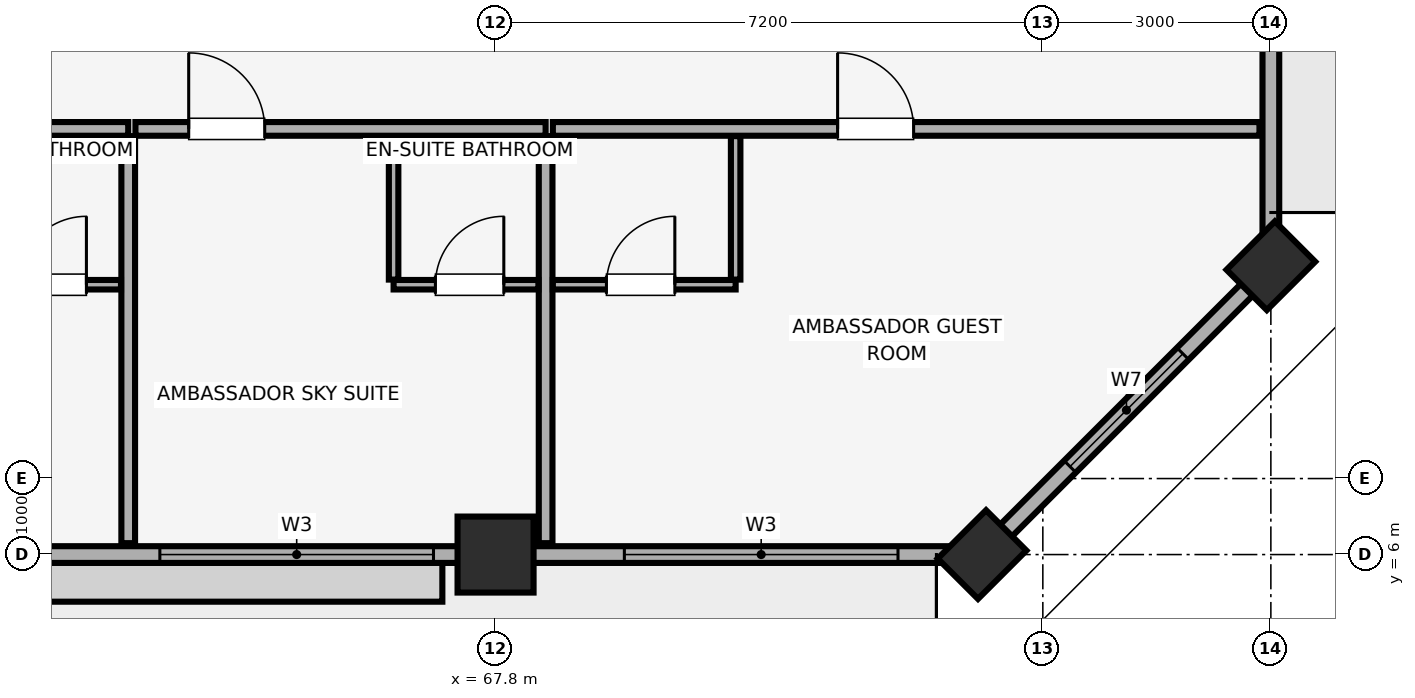
"""IFC4 building model, lengths in metres.
Left out: names, types, materials, properties, quantities, classifications, styles, units other than length and angle.
Written with IfcOpenShell. Run it as: python <this file> out.ifc"""

import sys

from ifc_helpers import new_model, si_unit, direction, frame, frame_2d, origin, origin_2d, place, context, subcontext, project, spatial, rectangle, extrude, element, fill, save


model = new_model("IFC4")
c1 = context("Model", 3, precision=1e-05, world=origin(), true_north=direction((0.0, 1.0)))
c2 = subcontext(c1, "Body", "Model", "MODEL_VIEW")
j1 = project(units=[si_unit("LENGTHUNIT", "METRE"), si_unit("PLANEANGLEUNIT", "RADIAN")], contexts=[c1])
p1 = place(None, origin())
s1 = spatial("IfcSite", under=j1, at=p1, CompositionType="ELEMENT")
p2 = place(p1, origin())
s2 = spatial("IfcBuilding", under=s1, at=p2, CompositionType="ELEMENT")
p3 = place(p2, frame((0.0, 0.0, 229.15)))
s3 = spatial("IfcBuildingStorey", under=s2, at=p3, CompositionType="ELEMENT", Elevation=229.15)
p4 = place(p3, frame((67.8, 6.0, 0.0), z_axis=(0.0, 0.0, 1.0), x_axis=(1.0, 0.0, 0.0)))
e1 = element("IfcColumn", 1, at=p4, inside=s3, PredefinedType="COLUMN", context=c2, shape_type="SweptSolid", body=[
    extrude(rectangle(XDim=1.0, YDim=1.0, at=origin_2d()), origin(), (0.0, 0.0, 1.0), 3.71),
])
for number, where, z_axis, x_axis in (
    (2, (74.2, 6.0, 0.0), (0.0, 0.0, 1.0), (0.707, 0.707, 0.0)),
    (3, (78.0, 9.8, 0.0), (0.0, 0.0, 1.0), (0.707, 0.707, 0.0)),
):
    element("IfcColumn", number, at=place(p3, frame(where, z_axis=z_axis, x_axis=x_axis)), inside=s3, PredefinedType="PILASTER", context=c2, shape_type="SweptSolid", body=[
        extrude(rectangle(XDim=0.9, YDim=0.75, at=origin_2d()), origin(), (0.0, 0.0, 1.0), 3.71),
    ])
p5 = place(p3, frame((9.8, 6.0, 0.0), z_axis=(0.0, 0.0, 1.0), x_axis=(1.0, 0.0, 0.0)))
e4 = element("IfcWall", 4, at=p5, inside=s3, PredefinedType="SOLIDWALL", context=c2, shape_type="SweptSolid", body=[
    extrude(rectangle(XDim=64.4, YDim=0.22, at=frame_2d((32.2, 0.0))), origin(), (0.0, 0.0, 1.0), 2.91),
])
p6 = place(p5, frame((3.25, 0.0, 0.0)))
e5 = element("IfcOpeningElement", 5, at=p6, cuts=e4, PredefinedType="OPENING", context=c2, shape_type="SweptSolid", body=[
    extrude(rectangle(XDim=1.1, YDim=2.15, at=frame_2d((0.55, 1.075))), frame((0.0, 0.12, 0.0), z_axis=(0.0, -1.0, 0.0), x_axis=(1.0, 0.0, 0.0)), (0.0, 0.0, 1.0), 0.24),
])
p7 = place(p5, frame((24.45, 0.0, 0.0)))
e6 = element("IfcOpeningElement", 6, at=p7, cuts=e4, PredefinedType="OPENING", context=c2, shape_type="SweptSolid", body=[
    extrude(rectangle(XDim=1.1, YDim=2.15, at=frame_2d((0.55, 1.075))), frame((0.0, 0.12, 0.0), z_axis=(0.0, -1.0, 0.0), x_axis=(1.0, 0.0, 0.0)), (0.0, 0.0, 1.0), 0.24),
])
p8 = place(p5, frame((45.65, 0.0, 0.0)))
e7 = element("IfcOpeningElement", 7, at=p8, cuts=e4, PredefinedType="OPENING", context=c2, shape_type="SweptSolid", body=[
    extrude(rectangle(XDim=1.1, YDim=2.15, at=frame_2d((0.55, 1.075))), frame((0.0, 0.12, 0.0), z_axis=(0.0, -1.0, 0.0), x_axis=(1.0, 0.0, 0.0)), (0.0, 0.0, 1.0), 0.24),
])
p9 = place(p5, frame((0.825, 0.0, 0.85)))
e8 = element("IfcOpeningElement", 8, at=p9, cuts=e4, PredefinedType="OPENING", context=c2, shape_type="SweptSolid", body=[
    extrude(rectangle(XDim=1.5, YDim=1.4, at=frame_2d((0.75, 0.7))), frame((0.0, 0.12, 0.0), z_axis=(0.0, -1.0, 0.0), x_axis=(1.0, 0.0, 0.0)), (0.0, 0.0, 1.0), 0.24),
])
p10 = place(p5, frame((7.217, 0.0, 0.85)))
e9 = element("IfcOpeningElement", 9, at=p10, cuts=e4, PredefinedType="OPENING", context=c2, shape_type="SweptSolid", body=[
    extrude(rectangle(XDim=3.2, YDim=1.85, at=frame_2d((1.6, 0.925))), frame((0.0, 0.12, 0.0), z_axis=(0.0, -1.0, 0.0), x_axis=(1.0, 0.0, 0.0)), (0.0, 0.0, 1.0), 0.24),
])
p11 = place(p5, frame((11.267, 0.0, 0.85)))
e10 = element("IfcOpeningElement", 10, at=p11, cuts=e4, PredefinedType="OPENING", context=c2, shape_type="SweptSolid", body=[
    extrude(rectangle(XDim=1.5, YDim=1.4, at=frame_2d((0.75, 0.7))), frame((0.0, 0.12, 0.0), z_axis=(0.0, -1.0, 0.0), x_axis=(1.0, 0.0, 0.0)), (0.0, 0.0, 1.0), 0.24),
])
p12 = place(p5, frame((16.663, 0.0, 0.85)))
e11 = element("IfcOpeningElement", 11, at=p12, cuts=e4, PredefinedType="OPENING", context=c2, shape_type="SweptSolid", body=[
    extrude(rectangle(XDim=3.2, YDim=1.85, at=frame_2d((1.6, 0.925))), frame((0.0, 0.12, 0.0), z_axis=(0.0, -1.0, 0.0), x_axis=(1.0, 0.0, 0.0)), (0.0, 0.0, 1.0), 0.24),
])
p13 = place(p5, frame((22.098, 0.0, 0.85)))
e12 = element("IfcOpeningElement", 12, at=p13, cuts=e4, PredefinedType="OPENING", context=c2, shape_type="SweptSolid", body=[
    extrude(rectangle(XDim=1.5, YDim=1.4, at=frame_2d((0.75, 0.7))), frame((0.0, 0.12, 0.0), z_axis=(0.0, -1.0, 0.0), x_axis=(1.0, 0.0, 0.0)), (0.0, 0.0, 1.0), 0.24),
])
p14 = place(p5, frame((29.0, 0.0, 0.85)))
e13 = element("IfcOpeningElement", 13, at=p14, cuts=e4, PredefinedType="OPENING", context=c2, shape_type="SweptSolid", body=[
    extrude(rectangle(XDim=2.4, YDim=1.5, at=frame_2d((1.2, 0.75))), frame((0.0, 0.12, 0.0), z_axis=(0.0, -1.0, 0.0), x_axis=(1.0, 0.0, 0.0)), (0.0, 0.0, 1.0), 0.24),
])
p15 = place(p5, frame((32.4, 0.0, 0.85)))
e14 = element("IfcOpeningElement", 14, at=p15, cuts=e4, PredefinedType="OPENING", context=c2, shape_type="SweptSolid", body=[
    extrude(rectangle(XDim=3.2, YDim=1.85, at=frame_2d((1.6, 0.925))), frame((0.0, 0.12, 0.0), z_axis=(0.0, -1.0, 0.0), x_axis=(1.0, 0.0, 0.0)), (0.0, 0.0, 1.0), 0.24),
])
p16 = place(p5, frame((38.138, 0.0, 0.85)))
e15 = element("IfcOpeningElement", 15, at=p16, cuts=e4, PredefinedType="OPENING", context=c2, shape_type="SweptSolid", body=[
    extrude(rectangle(XDim=3.6, YDim=1.75, at=frame_2d((1.8, 0.875))), frame((0.0, 0.12, 0.0), z_axis=(0.0, -1.0, 0.0), x_axis=(1.0, 0.0, 0.0)), (0.0, 0.0, 1.0), 0.24),
])
p17 = place(p5, frame((48.387, 0.0, 0.85)))
e16 = element("IfcOpeningElement", 16, at=p17, cuts=e4, PredefinedType="OPENING", context=c2, shape_type="SweptSolid", body=[
    extrude(rectangle(XDim=1.5, YDim=1.4, at=frame_2d((0.75, 0.7))), frame((0.0, 0.12, 0.0), z_axis=(0.0, -1.0, 0.0), x_axis=(1.0, 0.0, 0.0)), (0.0, 0.0, 1.0), 0.24),
])
p18 = place(p5, frame((53.583, 0.0, 0.85)))
e17 = element("IfcOpeningElement", 17, at=p18, cuts=e4, PredefinedType="OPENING", context=c2, shape_type="SweptSolid", body=[
    extrude(rectangle(XDim=3.6, YDim=1.75, at=frame_2d((1.8, 0.875))), frame((0.0, 0.12, 0.0), z_axis=(0.0, -1.0, 0.0), x_axis=(1.0, 0.0, 0.0)), (0.0, 0.0, 1.0), 0.24),
])
p19 = place(p5, frame((59.695, 0.0, 0.85)))
e18 = element("IfcOpeningElement", 18, at=p19, cuts=e4, PredefinedType="OPENING", context=c2, shape_type="SweptSolid", body=[
    extrude(rectangle(XDim=3.6, YDim=1.75, at=frame_2d((1.8, 0.875))), frame((0.0, 0.12, 0.0), z_axis=(0.0, -1.0, 0.0), x_axis=(1.0, 0.0, 0.0)), (0.0, 0.0, 1.0), 0.24),
])
p20 = place(p3, frame((74.2, 6.0, 0.0), z_axis=(0.0, 0.0, 1.0), x_axis=(0.707106781187, 0.707106781187, 0.0)))
e19 = element("IfcWall", 19, at=p20, inside=s3, PredefinedType="SOLIDWALL", context=c2, shape_type="SweptSolid", body=[
    extrude(rectangle(XDim=5.374, YDim=0.22, at=frame_2d((2.687, 0.0))), origin(), (0.0, 0.0, 1.0), 2.91),
])
p21 = place(p20, frame((1.637, 0.0, 0.85)))
e20 = element("IfcOpeningElement", 20, at=p21, cuts=e19, PredefinedType="OPENING", context=c2, shape_type="SweptSolid", body=[
    extrude(rectangle(XDim=2.1, YDim=1.6, at=frame_2d((1.05, 0.8))), frame((0.0, 0.12, 0.0), z_axis=(0.0, -1.0, 0.0), x_axis=(1.0, 0.0, 0.0)), (0.0, 0.0, 1.0), 0.24),
])
p22 = place(p3, frame((78.0, 9.8, 0.0), z_axis=(0.0, 0.0, 1.0), x_axis=(0.0, 1.0, 0.0)))
e21 = element("IfcWall", 21, at=p22, inside=s3, PredefinedType="SOLIDWALL", context=c2, shape_type="SweptSolid", body=[
    extrude(rectangle(XDim=35.4, YDim=0.22, at=frame_2d((17.7, 0.0))), origin(), (0.0, 0.0, 1.0), 2.91),
])
p23 = place(p22, frame((11.7, 0.0, 0.0)))
e22 = element("IfcOpeningElement", 22, at=p23, cuts=e21, PredefinedType="OPENING", context=c2, shape_type="SweptSolid", body=[
    extrude(rectangle(XDim=1.4, YDim=2.2, at=frame_2d((0.7, 1.1))), frame((0.0, 0.12, 0.0), z_axis=(0.0, -1.0, 0.0), x_axis=(1.0, 0.0, 0.0)), (0.0, 0.0, 1.0), 0.24),
])
p24 = place(p22, frame((6.74, 0.0, 0.85)))
e23 = element("IfcOpeningElement", 23, at=p24, cuts=e21, PredefinedType="OPENING", context=c2, shape_type="SweptSolid", body=[
    extrude(rectangle(XDim=3.6, YDim=1.65, at=frame_2d((1.8, 0.825))), frame((0.0, 0.12, 0.0), z_axis=(0.0, -1.0, 0.0), x_axis=(1.0, 0.0, 0.0)), (0.0, 0.0, 1.0), 0.24),
])
p25 = place(p22, frame((14.46, 0.0, 0.85)))
e24 = element("IfcOpeningElement", 24, at=p25, cuts=e21, PredefinedType="OPENING", context=c2, shape_type="SweptSolid", body=[
    extrude(rectangle(XDim=3.6, YDim=1.65, at=frame_2d((1.8, 0.825))), frame((0.0, 0.12, 0.0), z_axis=(0.0, -1.0, 0.0), x_axis=(1.0, 0.0, 0.0)), (0.0, 0.0, 1.0), 0.24),
])
p26 = place(p22, frame((20.815, 0.0, 0.85)))
e25 = element("IfcOpeningElement", 25, at=p26, cuts=e21, PredefinedType="OPENING", context=c2, shape_type="SweptSolid", body=[
    extrude(rectangle(XDim=3.0, YDim=1.5, at=frame_2d((1.5, 0.75))), frame((0.0, 0.12, 0.0), z_axis=(0.0, -1.0, 0.0), x_axis=(1.0, 0.0, 0.0)), (0.0, 0.0, 1.0), 0.24),
])
p27 = place(p22, frame((25.585, 0.0, 0.85)))
e26 = element("IfcOpeningElement", 26, at=p27, cuts=e21, PredefinedType="OPENING", context=c2, shape_type="SweptSolid", body=[
    extrude(rectangle(XDim=3.0, YDim=1.5, at=frame_2d((1.5, 0.75))), frame((0.0, 0.12, 0.0), z_axis=(0.0, -1.0, 0.0), x_axis=(1.0, 0.0, 0.0)), (0.0, 0.0, 1.0), 0.24),
])
p28 = place(p22, frame((30.915, 0.0, 0.85)))
e27 = element("IfcOpeningElement", 27, at=p28, cuts=e21, PredefinedType="OPENING", context=c2, shape_type="SweptSolid", body=[
    extrude(rectangle(XDim=3.6, YDim=1.65, at=frame_2d((1.8, 0.825))), frame((0.0, 0.12, 0.0), z_axis=(0.0, -1.0, 0.0), x_axis=(1.0, 0.0, 0.0)), (0.0, 0.0, 1.0), 0.24),
])
p29 = place(p3, frame((57.771, 11.6, 0.0), z_axis=(0.0, 0.0, 1.0), x_axis=(1.0, 0.0, 0.0)))
e28 = element("IfcWall", 28, at=p29, inside=s3, PredefinedType="PARTITIONING", context=c2, shape_type="SweptSolid", body=[
    extrude(rectangle(XDim=5.197, YDim=0.18, at=frame_2d((2.598, 0.0))), origin(), (0.0, 0.0, 1.0), 3.71),
])
p30 = place(p29, frame((0.65, 0.0, 0.0)))
e29 = element("IfcOpeningElement", 29, at=p30, cuts=e28, PredefinedType="OPENING", context=c2, shape_type="SweptSolid", body=[
    extrude(rectangle(XDim=1.0, YDim=2.15, at=frame_2d((0.5, 1.075))), frame((0.0, 0.1, 0.0), z_axis=(0.0, -1.0, 0.0), x_axis=(1.0, 0.0, 0.0)), (0.0, 0.0, 1.0), 0.2),
])
p31 = place(p3, frame((62.967, 6.15, 0.0), z_axis=(0.0, 0.0, 1.0), x_axis=(0.0, 1.0, 0.0)))
e30 = element("IfcWall", 30, at=p31, inside=s3, PredefinedType="PARTITIONING", context=c2, shape_type="SweptSolid", body=[
    extrude(rectangle(XDim=5.355, YDim=0.18, at=frame_2d((2.677, 0.0))), origin(), (0.0, 0.0, 1.0), 3.71),
])
p32 = place(p3, frame((60.967, 9.55, 0.0), z_axis=(0.0, 0.0, 1.0), x_axis=(1.0, 0.0, 0.0)))
e31 = element("IfcWall", 31, at=p32, inside=s3, PredefinedType="PARTITIONING", context=c2, shape_type="SweptSolid", body=[
    extrude(rectangle(XDim=1.905, YDim=0.125, at=frame_2d((0.953, 0.0))), origin(), (0.0, 0.0, 1.0), 3.71),
])
p33 = place(p32, frame((0.55, 0.0, 0.0)))
e32 = element("IfcOpeningElement", 32, at=p33, cuts=e31, PredefinedType="OPENING", context=c2, shape_type="SweptSolid", body=[
    extrude(rectangle(XDim=0.9, YDim=2.1, at=frame_2d((0.45, 1.05))), frame((0.0, 0.073, 0.0), z_axis=(0.0, -1.0, 0.0), x_axis=(1.0, 0.0, 0.0)), (0.0, 0.0, 1.0), 0.145),
])
p34 = place(p3, frame((63.062, 11.6, 0.0), z_axis=(0.0, 0.0, 1.0), x_axis=(1.0, 0.0, 0.0)))
e33 = element("IfcWall", 33, at=p34, inside=s3, PredefinedType="PARTITIONING", context=c2, shape_type="SweptSolid", body=[
    extrude(rectangle(XDim=5.396, YDim=0.18, at=frame_2d((2.698, 0.0))), origin(), (0.0, 0.0, 1.0), 3.71),
])
p35 = place(p34, frame((0.701, 0.0, 0.0)))
e34 = element("IfcOpeningElement", 34, at=p35, cuts=e33, PredefinedType="OPENING", context=c2, shape_type="SweptSolid", body=[
    extrude(rectangle(XDim=1.0, YDim=2.15, at=frame_2d((0.5, 1.075))), frame((0.0, 0.1, 0.0), z_axis=(0.0, -1.0, 0.0), x_axis=(1.0, 0.0, 0.0)), (0.0, 0.0, 1.0), 0.2),
])
p36 = place(p3, frame((68.458, 6.15, 0.0), z_axis=(0.0, 0.0, 1.0), x_axis=(0.0, 1.0, 0.0)))
e35 = element("IfcWall", 35, at=p36, inside=s3, PredefinedType="PARTITIONING", context=c2, shape_type="SweptSolid", body=[
    extrude(rectangle(XDim=5.355, YDim=0.18, at=frame_2d((2.677, 0.0))), origin(), (0.0, 0.0, 1.0), 3.71),
])
p37 = place(p3, frame((66.458, 9.55, 0.0), z_axis=(0.0, 0.0, 1.0), x_axis=(1.0, 0.0, 0.0)))
e36 = element("IfcWall", 36, at=p37, inside=s3, PredefinedType="PARTITIONING", context=c2, shape_type="SweptSolid", body=[
    extrude(rectangle(XDim=1.905, YDim=0.125, at=frame_2d((0.953, 0.0))), origin(), (0.0, 0.0, 1.0), 3.71),
])
p38 = place(p37, frame((0.55, 0.0, 0.0)))
e37 = element("IfcOpeningElement", 37, at=p38, cuts=e36, PredefinedType="OPENING", context=c2, shape_type="SweptSolid", body=[
    extrude(rectangle(XDim=0.9, YDim=2.1, at=frame_2d((0.45, 1.05))), frame((0.0, 0.073, 0.0), z_axis=(0.0, -1.0, 0.0), x_axis=(1.0, 0.0, 0.0)), (0.0, 0.0, 1.0), 0.145),
])
p39 = place(p3, frame((66.458, 9.617, 0.0), z_axis=(0.0, 0.0, 1.0), x_axis=(0.0, 1.0, 0.0)))
e38 = element("IfcWall", 38, at=p39, inside=s3, PredefinedType="PARTITIONING", context=c2, shape_type="SweptSolid", body=[
    extrude(rectangle(XDim=1.887, YDim=0.125, at=frame_2d((0.944, 0.0))), origin(), (0.0, 0.0, 1.0), 3.71),
])
p40 = place(p3, frame((68.554, 11.6, 0.0), z_axis=(0.0, 0.0, 1.0), x_axis=(1.0, 0.0, 0.0)))
e39 = element("IfcWall", 39, at=p40, inside=s3, PredefinedType="PARTITIONING", context=c2, shape_type="SweptSolid", body=[
    extrude(rectangle(XDim=9.296, YDim=0.18, at=frame_2d((4.648, 0.0))), origin(), (0.0, 0.0, 1.0), 3.71),
])
p41 = place(p40, frame((3.746, 0.0, 0.0)))
e40 = element("IfcOpeningElement", 40, at=p41, cuts=e39, PredefinedType="OPENING", context=c2, shape_type="SweptSolid", body=[
    extrude(rectangle(XDim=1.0, YDim=2.15, at=frame_2d((0.5, 1.075))), frame((0.0, 0.1, 0.0), z_axis=(0.0, -1.0, 0.0), x_axis=(1.0, 0.0, 0.0)), (0.0, 0.0, 1.0), 0.2),
])
p42 = place(p3, frame((68.554, 9.55, 0.0), z_axis=(0.0, 0.0, 1.0), x_axis=(1.0, 0.0, 0.0)))
e41 = element("IfcWall", 41, at=p42, inside=s3, PredefinedType="PARTITIONING", context=c2, shape_type="SweptSolid", body=[
    extrude(rectangle(XDim=2.405, YDim=0.125, at=frame_2d((1.202, 0.0))), origin(), (0.0, 0.0, 1.0), 3.71),
])
p43 = place(p42, frame((0.705, 0.0, 0.0)))
e42 = element("IfcOpeningElement", 42, at=p43, cuts=e41, PredefinedType="OPENING", context=c2, shape_type="SweptSolid", body=[
    extrude(rectangle(XDim=0.9, YDim=2.1, at=frame_2d((0.45, 1.05))), frame((0.0, 0.073, 0.0), z_axis=(0.0, -1.0, 0.0), x_axis=(1.0, 0.0, 0.0)), (0.0, 0.0, 1.0), 0.145),
])
p44 = place(p3, frame((70.958, 9.617, 0.0), z_axis=(0.0, 0.0, 1.0), x_axis=(0.0, 1.0, 0.0)))
e43 = element("IfcWall", 43, at=p44, inside=s3, PredefinedType="PARTITIONING", context=c2, shape_type="SweptSolid", body=[
    extrude(rectangle(XDim=1.887, YDim=0.125, at=frame_2d((0.944, 0.0))), origin(), (0.0, 0.0, 1.0), 3.71),
])
p45 = place(p21, origin())
e44 = element("IfcWindow", 44, at=p45, inside=s3, PartitioningType="SINGLE_PANEL", PredefinedType="WINDOW", context=c2, shape_type="SweptSolid", body=[
    extrude(rectangle(XDim=2.1, YDim=1.6, at=frame_2d((1.05, 0.8))), frame((0.0, 0.03, 0.0), z_axis=(0.0, -1.0, 0.0), x_axis=(1.0, 0.0, 0.0)), (0.0, 0.0, 1.0), 0.06),
])
fill(e20, e44)
p46 = place(p18, origin())
e45 = element("IfcWindow", 45, at=p46, inside=s3, PartitioningType="SINGLE_PANEL", PredefinedType="WINDOW", context=c2, shape_type="SweptSolid", body=[
    extrude(rectangle(XDim=3.6, YDim=1.75, at=frame_2d((1.8, 0.875))), frame((0.0, 0.03, 0.0), z_axis=(0.0, -1.0, 0.0), x_axis=(1.0, 0.0, 0.0)), (0.0, 0.0, 1.0), 0.06),
])
fill(e17, e45)
p47 = place(p19, origin())
e46 = element("IfcWindow", 46, at=p47, inside=s3, PartitioningType="SINGLE_PANEL", PredefinedType="WINDOW", context=c2, shape_type="SweptSolid", body=[
    extrude(rectangle(XDim=3.6, YDim=1.75, at=frame_2d((1.8, 0.875))), frame((0.0, 0.03, 0.0), z_axis=(0.0, -1.0, 0.0), x_axis=(1.0, 0.0, 0.0)), (0.0, 0.0, 1.0), 0.06),
])
fill(e18, e46)
p48 = place(p33, origin())
e47 = element("IfcDoor", 47, at=p48, inside=s3, OperationType="SINGLE_SWING_RIGHT", PredefinedType="DOOR", context=c2, shape_type="SweptSolid", body=[
    extrude(rectangle(XDim=0.9, YDim=2.1, at=frame_2d((0.45, 1.05))), frame((0.0, 0.025, 0.0), z_axis=(0.0, -1.0, 0.0), x_axis=(1.0, 0.0, 0.0)), (0.0, 0.0, 1.0), 0.05),
])
fill(e32, e47)
p49 = place(p35, origin())
e48 = element("IfcDoor", 48, at=p49, inside=s3, OperationType="SINGLE_SWING_LEFT", PredefinedType="DOOR", context=c2, shape_type="SweptSolid", body=[
    extrude(rectangle(XDim=1.0, YDim=2.15, at=frame_2d((0.5, 1.075))), frame((0.0, 0.025, 0.0), z_axis=(0.0, -1.0, 0.0), x_axis=(1.0, 0.0, 0.0)), (0.0, 0.0, 1.0), 0.05),
])
fill(e34, e48)
p50 = place(p38, origin())
e49 = element("IfcDoor", 49, at=p50, inside=s3, OperationType="SINGLE_SWING_RIGHT", PredefinedType="DOOR", context=c2, shape_type="SweptSolid", body=[
    extrude(rectangle(XDim=0.9, YDim=2.1, at=frame_2d((0.45, 1.05))), frame((0.0, 0.025, 0.0), z_axis=(0.0, -1.0, 0.0), x_axis=(1.0, 0.0, 0.0)), (0.0, 0.0, 1.0), 0.05),
])
fill(e37, e49)
p51 = place(p41, origin())
e50 = element("IfcDoor", 50, at=p51, inside=s3, OperationType="SINGLE_SWING_LEFT", PredefinedType="DOOR", context=c2, shape_type="SweptSolid", body=[
    extrude(rectangle(XDim=1.0, YDim=2.15, at=frame_2d((0.5, 1.075))), frame((0.0, 0.025, 0.0), z_axis=(0.0, -1.0, 0.0), x_axis=(1.0, 0.0, 0.0)), (0.0, 0.0, 1.0), 0.05),
])
fill(e40, e50)
p52 = place(p43, origin())
e51 = element("IfcDoor", 51, at=p52, inside=s3, OperationType="SINGLE_SWING_RIGHT", PredefinedType="DOOR", context=c2, shape_type="SweptSolid", body=[
    extrude(rectangle(XDim=0.9, YDim=2.1, at=frame_2d((0.45, 1.05))), frame((0.0, 0.025, 0.0), z_axis=(0.0, -1.0, 0.0), x_axis=(1.0, 0.0, 0.0)), (0.0, 0.0, 1.0), 0.05),
])
fill(e42, e51)
save(model, sys.argv[1])
